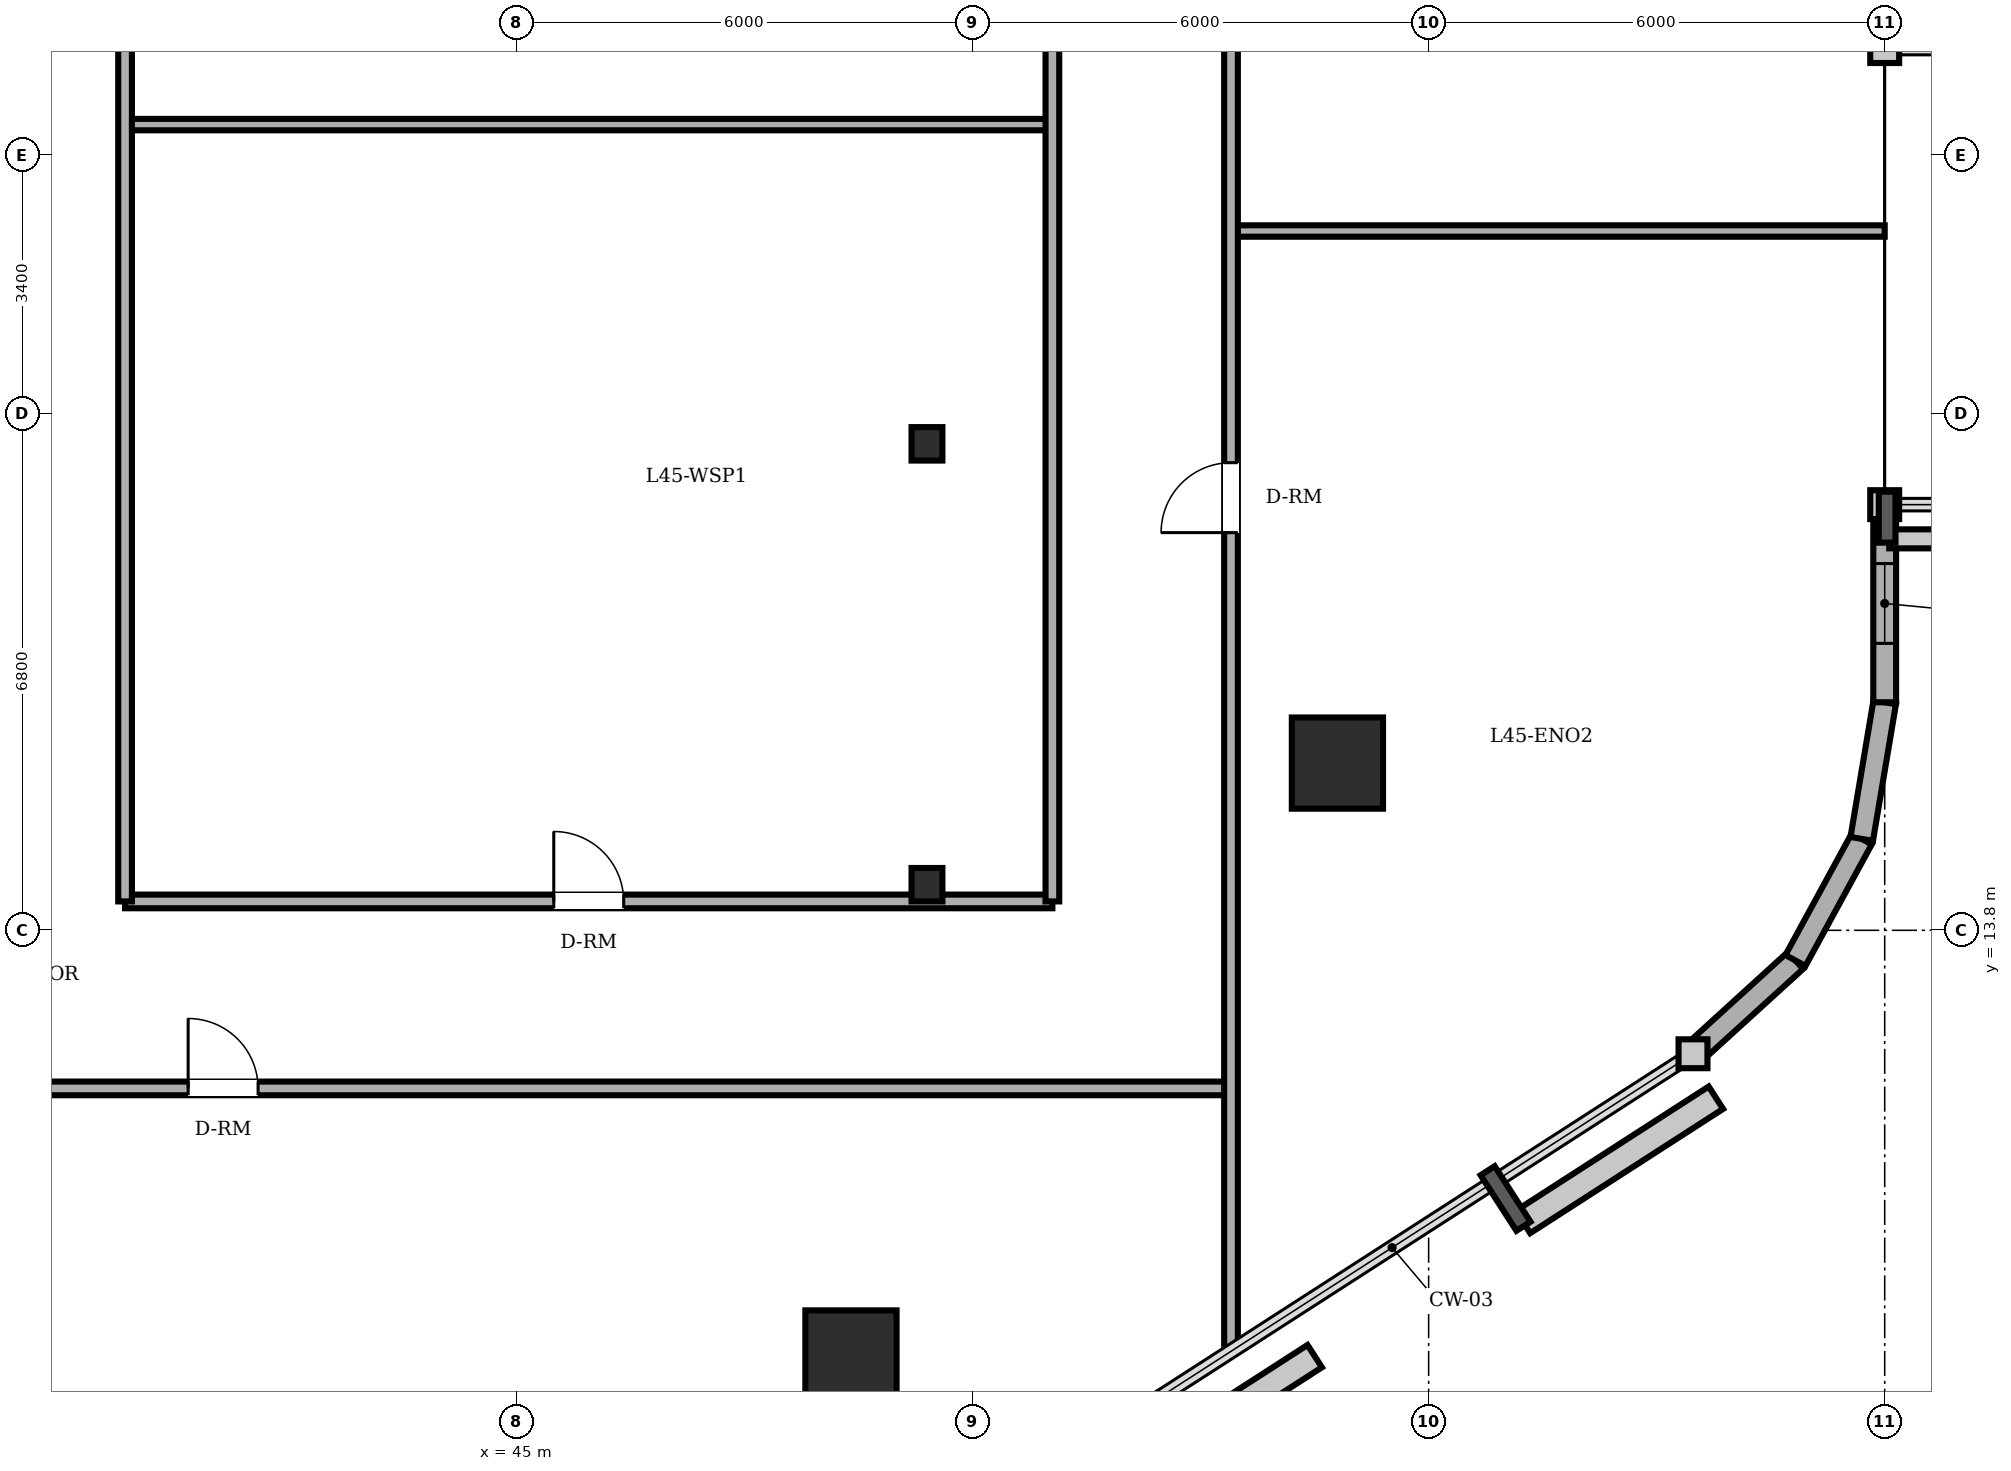
"""IFC4 building model, lengths in metres.
Left out: names, types, materials, properties, quantities, classifications, styles, units other than length and angle.
Written with IfcOpenShell. Run it as: python <this file> out.ifc"""

import sys

from ifc_helpers import new_model, si_unit, direction, frame, frame_2d, origin, origin_2d, place, context, subcontext, project, spatial, rectangle, circle, i_section, extrude, element, fill, save


model = new_model("IFC4")
c1 = context("Model", 3, precision=1e-05, world=origin(), true_north=direction((0.0, 1.0)))
c2 = subcontext(c1, "Body", "Model", "MODEL_VIEW")
j1 = project(units=[si_unit("LENGTHUNIT", "METRE"), si_unit("PLANEANGLEUNIT", "RADIAN")], contexts=[c1])
p1 = place(None, origin())
s1 = spatial("IfcSite", under=j1, at=p1, CompositionType="ELEMENT")
p2 = place(p1, origin())
s2 = spatial("IfcBuilding", under=s1, at=p2, CompositionType="ELEMENT")
p3 = place(p2, frame((0.0, 0.0, 172.6)))
s3 = spatial("IfcBuildingStorey", under=s2, at=p3, CompositionType="ELEMENT", Elevation=172.6)
for number, where, z_axis, x_axis in (
    (1, (49.4, 8.2, 0.0), (0.0, 0.0, 1.0), (1.0, 0.0, 0.0)),
    (2, (55.8, 16.0, 0.0), (0.0, 0.0, 1.0), (1.0, 0.0, 0.0)),
):
    element("IfcColumn", number, at=place(p3, frame(where, z_axis=z_axis, x_axis=x_axis)), inside=s3, PredefinedType="COLUMN", context=c2, shape_type="SweptSolid", body=[
        extrude(circle(Radius=0.6, at=origin_2d()), origin(), (0.0, 0.0, 1.0), 3.6),
    ])
for number, where, z_axis, x_axis in (
    (3, (50.4, 14.4, 0.0), (0.0, 0.0, 1.0), (1.0, 0.0, 0.0)),
    (4, (50.4, 20.2, 0.0), (0.0, 0.0, 1.0), (1.0, 0.0, 0.0)),
):
    element("IfcColumn", number, at=place(p3, frame(where, z_axis=z_axis, x_axis=x_axis)), inside=s3, PredefinedType="COLUMN", context=c2, shape_type="SweptSolid", body=[
        extrude(i_section(OverallWidth=0.406, OverallDepth=0.44, WebThickness=0.024, FlangeThickness=0.039, FilletRadius=0.015, at=origin_2d()), origin(), (0.0, 0.0, 1.0), 3.6),
    ])
p4 = place(p3, frame((60.478, 12.176, 0.0), z_axis=(0.0, 0.0, 1.0), x_axis=(0.73947929393, 0.673179302897, 0.0)))
e5 = element("IfcWall", 5, at=p4, inside=s3, PredefinedType="SOLIDWALL", context=c2, shape_type="SweptSolid", body=[
    extrude(rectangle(XDim=1.823, YDim=0.3, at=frame_2d((0.911, 0.0))), origin(), (0.0, 0.0, 1.0), 3.4),
])
p5 = place(p3, frame((61.826, 13.403, 0.0), z_axis=(0.0, 0.0, 1.0), x_axis=(0.478608030646, 0.878028674362, 0.0)))
e6 = element("IfcWall", 6, at=p5, inside=s3, PredefinedType="SOLIDWALL", context=c2, shape_type="SweptSolid", body=[
    extrude(rectangle(XDim=1.822, YDim=0.3, at=frame_2d((0.911, 0.0))), origin(), (0.0, 0.0, 1.0), 3.4),
])
p6 = place(p3, frame((62.698, 15.003, 0.0), z_axis=(0.0, 0.0, 1.0), x_axis=(0.165724081207, 0.986172159873, 0.0)))
e7 = element("IfcWall", 7, at=p6, inside=s3, PredefinedType="SOLIDWALL", context=c2, shape_type="SweptSolid", body=[
    extrude(rectangle(XDim=1.822, YDim=0.3, at=frame_2d((0.911, 0.0))), origin(), (0.0, 0.0, 1.0), 3.4),
])
p7 = place(p3, frame((63.0, 16.8, 0.0), z_axis=(0.0, 0.0, 1.0), x_axis=(0.0, 1.0, 0.0)))
e8 = element("IfcWall", 8, at=p7, inside=s3, PredefinedType="SOLIDWALL", context=c2, shape_type="SweptSolid", body=[
    extrude(rectangle(XDim=2.6, YDim=0.3, at=frame_2d((1.3, 0.0))), origin(), (0.0, 0.0, 1.0), 3.4),
])
p8 = place(p7, frame((0.775, 0.0, 0.85)))
e9 = element("IfcOpeningElement", 9, at=p8, cuts=e8, PredefinedType="OPENING", context=c2, shape_type="SweptSolid", body=[
    extrude(rectangle(XDim=1.05, YDim=1.55, at=frame_2d((0.525, 0.775))), frame((0.0, 0.16, 0.0), z_axis=(0.0, -1.0, 0.0), x_axis=(1.0, 0.0, 0.0)), (0.0, 0.0, 1.0), 0.32),
])
p9 = place(p3, frame((13.8, 11.72, 0.0), z_axis=(0.0, 0.0, 1.0), x_axis=(1.0, 0.0, 0.0)))
e10 = element("IfcWall", 10, at=p9, inside=s3, PredefinedType="PARTITIONING", context=c2, shape_type="SweptSolid", body=[
    extrude(rectangle(XDim=40.6, YDim=0.18, at=frame_2d((20.3, 0.0))), origin(), (0.0, 0.0, 1.0), 3.4),
])
p10 = place(p9, frame((12.24, 0.0, 0.0)))
e11 = element("IfcOpeningElement", 11, at=p10, cuts=e10, PredefinedType="OPENING", context=c2, shape_type="SweptSolid", body=[
    extrude(rectangle(XDim=0.92, YDim=2.1, at=frame_2d((0.46, 1.05))), frame((0.0, 0.1, 0.0), z_axis=(0.0, -1.0, 0.0), x_axis=(1.0, 0.0, 0.0)), (0.0, 0.0, 1.0), 0.2),
])
p11 = place(p9, frame((5.54, 0.0, 0.0)))
e12 = element("IfcOpeningElement", 12, at=p11, cuts=e10, PredefinedType="OPENING", context=c2, shape_type="SweptSolid", body=[
    extrude(rectangle(XDim=0.92, YDim=2.1, at=frame_2d((0.46, 1.05))), frame((0.0, 0.1, 0.0), z_axis=(0.0, -1.0, 0.0), x_axis=(1.0, 0.0, 0.0)), (0.0, 0.0, 1.0), 0.2),
])
p12 = place(p9, frame((26.88, 0.0, 0.0)))
e13 = element("IfcOpeningElement", 13, at=p12, cuts=e10, PredefinedType="OPENING", context=c2, shape_type="SweptSolid", body=[
    extrude(rectangle(XDim=0.92, YDim=2.1, at=frame_2d((0.46, 1.05))), frame((0.0, 0.1, 0.0), z_axis=(0.0, -1.0, 0.0), x_axis=(1.0, 0.0, 0.0)), (0.0, 0.0, 1.0), 0.2),
])
p13 = place(p3, frame((39.85, 14.18, 0.0), z_axis=(0.0, 0.0, 1.0), x_axis=(1.0, 0.0, 0.0)))
e14 = element("IfcWall", 14, at=p13, inside=s3, PredefinedType="PARTITIONING", context=c2, shape_type="SweptSolid", body=[
    extrude(rectangle(XDim=12.2, YDim=0.18, at=frame_2d((6.1, 0.0))), origin(), (0.0, 0.0, 1.0), 2.932),
])
p14 = place(p13, frame((5.64, 0.0, 0.0)))
e15 = element("IfcOpeningElement", 15, at=p14, cuts=e14, PredefinedType="OPENING", context=c2, shape_type="SweptSolid", body=[
    extrude(rectangle(XDim=0.92, YDim=2.1, at=frame_2d((0.46, 1.05))), frame((0.0, 0.1, 0.0), z_axis=(0.0, -1.0, 0.0), x_axis=(1.0, 0.0, 0.0)), (0.0, 0.0, 1.0), 0.2),
])
p15 = place(p3, frame((54.4, 23.0, 0.0), z_axis=(0.0, 0.0, 1.0), x_axis=(1.0, 0.0, 0.0)))
e16 = element("IfcWall", 16, at=p15, inside=s3, PredefinedType="PARTITIONING", context=c2, shape_type="SweptSolid", body=[
    extrude(rectangle(XDim=8.6, YDim=0.15, at=frame_2d((4.3, 0.0))), origin(), (0.0, 0.0, 1.0), 3.4),
])
p16 = place(p3, frame((39.85, 24.4, 0.0), z_axis=(0.0, 0.0, 1.0), x_axis=(1.0, 0.0, 0.0)))
e17 = element("IfcWall", 17, at=p16, inside=s3, PredefinedType="PARTITIONING", context=c2, shape_type="SweptSolid", body=[
    extrude(rectangle(XDim=12.2, YDim=0.15, at=frame_2d((6.1, 0.0))), origin(), (0.0, 0.0, 1.0), 3.4),
])
p17 = place(p3, frame((39.85, 14.18, 0.0), z_axis=(0.0, 0.0, 1.0), x_axis=(0.0, 1.0, 0.0)))
e18 = element("IfcWall", 18, at=p17, inside=s3, PredefinedType="PARTITIONING", context=c2, shape_type="SweptSolid", body=[
    extrude(rectangle(XDim=27.62, YDim=0.18, at=frame_2d((13.81, 0.0))), origin(), (0.0, 0.0, 1.0), 3.4),
])
p18 = place(p17, frame((14.47, 0.0, 0.0)))
e19 = element("IfcOpeningElement", 19, at=p18, cuts=e18, PredefinedType="OPENING", context=c2, shape_type="SweptSolid", body=[
    extrude(rectangle(XDim=0.92, YDim=2.1, at=frame_2d((0.46, 1.05))), frame((0.0, 0.1, 0.0), z_axis=(0.0, -1.0, 0.0), x_axis=(1.0, 0.0, 0.0)), (0.0, 0.0, 1.0), 0.2),
])
p19 = place(p3, frame((52.05, 14.18, 0.0), z_axis=(0.0, 0.0, 1.0), x_axis=(0.0, 1.0, 0.0)))
e20 = element("IfcWall", 20, at=p19, inside=s3, PredefinedType="PARTITIONING", context=c2, shape_type="SweptSolid", body=[
    extrude(rectangle(XDim=27.008, YDim=0.18, at=frame_2d((13.504, 0.0))), origin(), (0.0, 0.0, 1.0), 3.4),
])
p20 = place(p3, frame((54.4, 8.261, 0.0), z_axis=(0.0, 0.0, 1.0), x_axis=(0.0, 1.0, 0.0)))
e21 = element("IfcWall", 21, at=p20, inside=s3, PredefinedType="PARTITIONING", context=c2, shape_type="SweptSolid", body=[
    extrude(rectangle(XDim=22.089, YDim=0.18, at=frame_2d((11.044, 0.0))), origin(), (0.0, 0.0, 1.0), 3.4),
])
p21 = place(p20, frame((17.694, 0.0, 0.0)))
e22 = element("IfcOpeningElement", 22, at=p21, cuts=e21, PredefinedType="OPENING", context=c2, shape_type="SweptSolid", body=[
    extrude(rectangle(XDim=0.92, YDim=2.1, at=frame_2d((0.46, 1.05))), frame((0.0, 0.1, 0.0), z_axis=(0.0, -1.0, 0.0), x_axis=(1.0, 0.0, 0.0)), (0.0, 0.0, 1.0), 0.2),
])
p22 = place(p20, frame((10.771, 0.0, 0.0)))
e23 = element("IfcOpeningElement", 23, at=p22, cuts=e21, PredefinedType="OPENING", context=c2, shape_type="SweptSolid", body=[
    extrude(rectangle(XDim=0.92, YDim=2.1, at=frame_2d((0.46, 1.05))), frame((0.0, 0.1, 0.0), z_axis=(0.0, -1.0, 0.0), x_axis=(1.0, 0.0, 0.0)), (0.0, 0.0, 1.0), 0.2),
])
p23 = place(p8, origin())
e24 = element("IfcWindow", 24, at=p23, inside=s3, PartitioningType="SINGLE_PANEL", PredefinedType="WINDOW", context=c2, shape_type="SweptSolid", body=[
    extrude(rectangle(XDim=1.05, YDim=1.55, at=frame_2d((0.525, 0.775))), frame((0.0, 0.03, 0.0), z_axis=(0.0, -1.0, 0.0), x_axis=(1.0, 0.0, 0.0)), (0.0, 0.0, 1.0), 0.06),
])
fill(e9, e24)
p24 = place(p14, origin())
e25 = element("IfcDoor", 25, at=p24, inside=s3, OperationType="SINGLE_SWING_LEFT", PredefinedType="DOOR", context=c2, shape_type="SweptSolid", body=[
    extrude(rectangle(XDim=0.92, YDim=2.1, at=frame_2d((0.46, 1.05))), frame((0.0, 0.025, 0.0), z_axis=(0.0, -1.0, 0.0), x_axis=(1.0, 0.0, 0.0)), (0.0, 0.0, 1.0), 0.05),
])
fill(e15, e25)
p25 = place(p22, origin())
e26 = element("IfcDoor", 26, at=p25, inside=s3, OperationType="SINGLE_SWING_LEFT", PredefinedType="DOOR", context=c2, shape_type="SweptSolid", body=[
    extrude(rectangle(XDim=0.92, YDim=2.1, at=frame_2d((0.46, 1.05))), frame((0.0, 0.025, 0.0), z_axis=(0.0, -1.0, 0.0), x_axis=(1.0, 0.0, 0.0)), (0.0, 0.0, 1.0), 0.05),
])
fill(e23, e26)
p26 = place(p12, origin())
e27 = element("IfcDoor", 27, at=p26, inside=s3, OperationType="SINGLE_SWING_LEFT", PredefinedType="DOOR", context=c2, shape_type="SweptSolid", body=[
    extrude(rectangle(XDim=0.92, YDim=2.1, at=frame_2d((0.46, 1.05))), frame((0.0, 0.025, 0.0), z_axis=(0.0, -1.0, 0.0), x_axis=(1.0, 0.0, 0.0)), (0.0, 0.0, 1.0), 0.05),
])
fill(e13, e27)
save(model, sys.argv[1])
